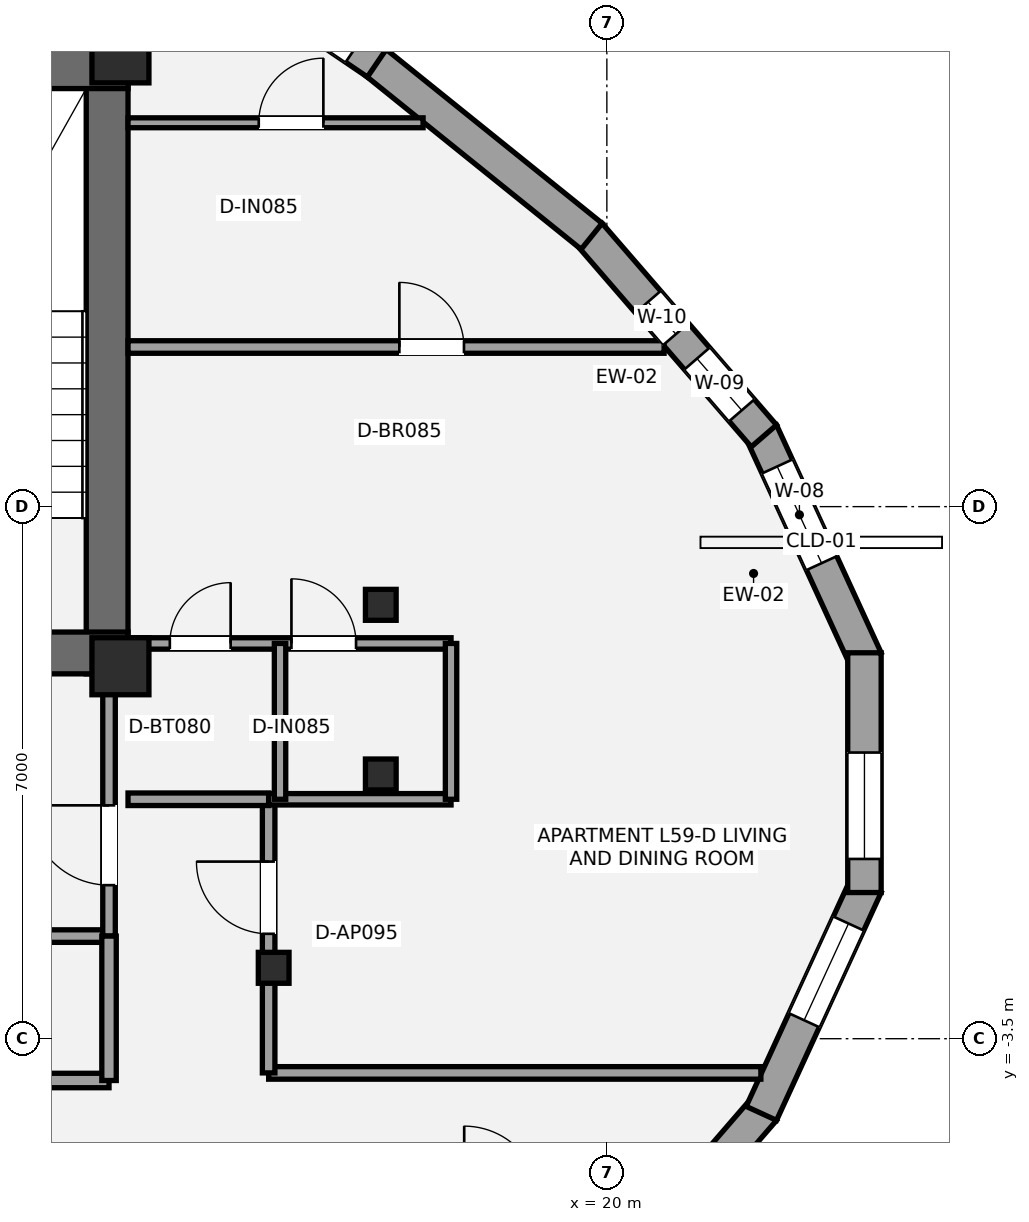
"""IFC4 building model, lengths in metres.
Left out: names, types, materials, properties, quantities, classifications, styles, units other than length and angle.
Written with IfcOpenShell. Run it as: python <this file> out.ifc"""

import sys

from ifc_helpers import new_model, si_unit, direction, frame, frame_2d, origin, origin_2d, place, context, subcontext, project, spatial, rectangle, i_section, extrude, element, fill, save


model = new_model("IFC4")
c1 = context("Model", 3, precision=1e-05, world=origin(), true_north=direction((0.0, 1.0)))
c2 = subcontext(c1, "Body", "Model", "MODEL_VIEW")
j1 = project(units=[si_unit("LENGTHUNIT", "METRE"), si_unit("PLANEANGLEUNIT", "RADIAN")], contexts=[c1])
p1 = place(None, origin())
s1 = spatial("IfcSite", under=j1, at=p1, CompositionType="ELEMENT")
p2 = place(p1, origin())
s2 = spatial("IfcBuilding", under=s1, at=p2, CompositionType="ELEMENT")
p3 = place(p2, frame((0.0, 0.0, 213.15)))
s3 = spatial("IfcBuildingStorey", under=s2, at=p3, CompositionType="ELEMENT", Elevation=213.15)
p4 = place(p3, frame((13.425, 1.3, 0.0), z_axis=(0.0, 0.0, 1.0), x_axis=(0.0, 1.0, 0.0)))
e1 = element("IfcWall", 1, at=p4, inside=s3, PredefinedType="SHEAR", context=c2, shape_type="SweptSolid", body=[
    extrude(rectangle(XDim=8.25, YDim=0.55, at=frame_2d((4.125, 0.0))), origin(), (0.0, 0.0, 1.0), 3.15),
])
p5 = place(p3, frame((4.525, 9.275, 0.0), z_axis=(0.0, 0.0, 1.0), x_axis=(1.0, 0.0, 0.0)))
e2 = element("IfcWall", 2, at=p5, inside=s3, PredefinedType="SHEAR", context=c2, shape_type="SweptSolid", body=[
    extrude(rectangle(XDim=9.175, YDim=0.55, at=frame_2d((4.587, 0.0))), origin(), (0.0, 0.0, 1.0), 3.15),
])
p6 = place(p3, frame((13.7, 1.575, 0.0), z_axis=(0.0, 0.0, 1.0), x_axis=(-1.0, 0.0, 0.0)))
e3 = element("IfcWall", 3, at=p6, inside=s3, PredefinedType="SHEAR", context=c2, shape_type="SweptSolid", body=[
    extrude(rectangle(XDim=8.775, YDim=0.55, at=frame_2d((4.387, 0.0))), origin(), (0.0, 0.0, 1.0), 3.15),
])
p7 = place(p6, frame((2.35, 0.0, 0.0)))
e4 = element("IfcOpeningElement", 4, at=p7, cuts=e3, PredefinedType="OPENING", context=c2, shape_type="SweptSolid", body=[
    extrude(rectangle(XDim=1.05, YDim=2.15, at=frame_2d((0.525, 1.075))), frame((0.0, 0.285, 0.0), z_axis=(0.0, -1.0, 0.0), x_axis=(1.0, 0.0, 0.0)), (0.0, 0.0, 1.0), 0.57),
])
p8 = place(p6, frame((4.35, 0.0, 0.0)))
e5 = element("IfcOpeningElement", 5, at=p8, cuts=e3, PredefinedType="OPENING", context=c2, shape_type="SweptSolid", body=[
    extrude(rectangle(XDim=1.1, YDim=2.2, at=frame_2d((0.55, 1.1))), frame((0.0, 0.285, 0.0), z_axis=(0.0, -1.0, 0.0), x_axis=(1.0, 0.0, 0.0)), (0.0, 0.0, 1.0), 0.57),
])
for number, where, z_axis, x_axis in (
    (6, (13.6, 1.4, 0.0), (0.0, 0.0, 1.0), (1.0, 0.0, 0.0)),
    (7, (13.6, 9.45, 0.0), (0.0, 0.0, 1.0), (1.0, 0.0, 0.0)),
):
    element("IfcColumn", number, at=place(p3, frame(where, z_axis=z_axis, x_axis=x_axis)), inside=s3, PredefinedType="PILASTER", context=c2, shape_type="SweptSolid", body=[
        extrude(rectangle(XDim=0.75, YDim=0.75, at=origin_2d()), origin(), (0.0, 0.0, 1.0), 3.15),
    ])
for number, where, z_axis, x_axis in (
    (8, (17.026, 2.208, 0.0), (0.0, 0.0, 1.0), (1.0, 0.0, 0.0)),
    (9, (15.616, -2.567, 0.0), (0.0, 0.0, 1.0), (1.0, 0.0, 0.0)),
    (10, (17.026, -0.024, 0.0), (0.0, 0.0, 1.0), (1.0, 0.0, 0.0)),
):
    element("IfcColumn", number, at=place(p3, frame(where, z_axis=z_axis, x_axis=x_axis)), inside=s3, PredefinedType="COLUMN", context=c2, shape_type="SweptSolid", body=[
        extrude(i_section(OverallWidth=0.404, OverallDepth=0.407, WebThickness=0.027, FlangeThickness=0.044, at=origin_2d()), origin(), (0.0, 0.0, 1.0), 3.15),
    ])
p9 = place(p3, frame((22.033, 4.482, 0.0), z_axis=(0.0, 0.0, 1.0), x_axis=(0.417358097416, -0.908742107818, 0.0)))
e11 = element("IfcWall", 11, at=p9, inside=s3, PredefinedType="STANDARD", context=c2, shape_type="SweptSolid", body=[
    extrude(rectangle(XDim=3.298, YDim=0.44, at=frame_2d((1.649, 0.0))), origin(), (0.0, 0.0, 1.0), 2.336),
])
p10 = place(p9, frame((0.5, 0.0, 0.55)))
e12 = element("IfcOpeningElement", 12, at=p10, cuts=e11, PredefinedType="OPENING", context=c2, shape_type="SweptSolid", body=[
    extrude(rectangle(XDim=1.4, YDim=1.55, at=frame_2d((0.7, 0.775))), frame((0.0, 0.23, 0.0), z_axis=(0.0, -1.0, 0.0), x_axis=(1.0, 0.0, 0.0)), (0.0, 0.0, 1.0), 0.46),
])
p11 = place(p3, frame((19.771, 7.084, 0.0), z_axis=(0.0, 0.0, 1.0), x_axis=(0.654143325051, -0.75637061702, 0.0)))
e13 = element("IfcWall", 13, at=p11, inside=s3, PredefinedType="STANDARD", context=c2, shape_type="SweptSolid", body=[
    extrude(rectangle(XDim=3.508, YDim=0.44, at=frame_2d((1.754, 0.0))), origin(), (0.0, 0.0, 1.0), 2.336),
])
p12 = place(p11, frame((2.163, 0.0, 0.58)))
e14 = element("IfcOpeningElement", 14, at=p12, cuts=e13, PredefinedType="OPENING", context=c2, shape_type="SweptSolid", body=[
    extrude(rectangle(XDim=0.9, YDim=1.35, at=frame_2d((0.45, 0.675))), frame((0.0, 0.23, 0.0), z_axis=(0.0, -1.0, 0.0), x_axis=(1.0, 0.0, 0.0)), (0.0, 0.0, 1.0), 0.46),
])
p13 = place(p11, frame((1.178, 0.0, 1.05)))
e15 = element("IfcOpeningElement", 15, at=p13, cuts=e13, PredefinedType="OPENING", context=c2, shape_type="SweptSolid", body=[
    extrude(rectangle(XDim=0.56, YDim=1.15, at=frame_2d((0.28, 0.575))), frame((0.0, 0.23, 0.0), z_axis=(0.0, -1.0, 0.0), x_axis=(1.0, 0.0, 0.0)), (0.0, 0.0, 1.0), 0.46),
])
p14 = place(p3, frame((16.958, 9.345, 0.0), z_axis=(0.0, 0.0, 1.0), x_axis=(0.778794775864, -0.627278803314, 0.0)))
e16 = element("IfcWall", 16, at=p14, inside=s3, PredefinedType="STANDARD", context=c2, shape_type="SweptSolid", body=[
    extrude(rectangle(XDim=3.648, YDim=0.44, at=frame_2d((1.824, 0.0))), origin(), (0.0, 0.0, 1.0), 2.336),
])
p15 = place(p3, frame((13.907, 11.413, 0.0), z_axis=(0.0, 0.0, 1.0), x_axis=(0.827592777121, -0.561328954586, 0.0)))
e17 = element("IfcWall", 17, at=p15, inside=s3, PredefinedType="STANDARD", context=c2, shape_type="SweptSolid", body=[
    extrude(rectangle(XDim=3.704, YDim=0.44, at=frame_2d((1.852, 0.0))), origin(), (0.0, 0.0, 1.0), 2.336),
])
p16 = place(p15, frame((1.958, 0.0, 0.58)))
e18 = element("IfcOpeningElement", 18, at=p16, cuts=e17, PredefinedType="OPENING", context=c2, shape_type="SweptSolid", body=[
    extrude(rectangle(XDim=1.4, YDim=1.55, at=frame_2d((0.7, 0.775))), frame((0.0, 0.23, 0.0), z_axis=(0.0, -1.0, 0.0), x_axis=(1.0, 0.0, 0.0)), (0.0, 0.0, 1.0), 0.46),
])
p17 = place(p3, frame((22.066, -4.43, 0.0), z_axis=(0.0, 0.0, 1.0), x_axis=(-0.654143325051, -0.75637061702, 0.0)))
e19 = element("IfcWall", 19, at=p17, inside=s3, PredefinedType="STANDARD", context=c2, shape_type="SweptSolid", body=[
    extrude(rectangle(XDim=3.508, YDim=0.44, at=frame_2d((1.754, 0.0))), origin(), (0.0, 0.0, 1.0), 2.336),
])
p18 = place(p17, frame((1.86, 0.0, 0.58)))
e20 = element("IfcOpeningElement", 20, at=p18, cuts=e19, PredefinedType="OPENING", context=c2, shape_type="SweptSolid", body=[
    extrude(rectangle(XDim=1.4, YDim=1.55, at=frame_2d((0.7, 0.775))), frame((0.0, 0.23, 0.0), z_axis=(0.0, -1.0, 0.0), x_axis=(1.0, 0.0, 0.0)), (0.0, 0.0, 1.0), 0.46),
])
p19 = place(p3, frame((23.409, -1.485, 0.0), z_axis=(0.0, 0.0, 1.0), x_axis=(-0.417358097416, -0.908742107818, 0.0)))
e21 = element("IfcWall", 21, at=p19, inside=s3, PredefinedType="STANDARD", context=c2, shape_type="SweptSolid", body=[
    extrude(rectangle(XDim=3.298, YDim=0.44, at=frame_2d((1.649, 0.0))), origin(), (0.0, 0.0, 1.0), 2.336),
])
p20 = place(p19, frame((0.55, 0.0, 0.55)))
e22 = element("IfcOpeningElement", 22, at=p20, cuts=e21, PredefinedType="OPENING", context=c2, shape_type="SweptSolid", body=[
    extrude(rectangle(XDim=1.4, YDim=1.55, at=frame_2d((0.7, 0.775))), frame((0.0, 0.23, 0.0), z_axis=(0.0, -1.0, 0.0), x_axis=(1.0, 0.0, 0.0)), (0.0, 0.0, 1.0), 0.46),
])
p21 = place(p3, frame((23.389, 1.577, 0.0), z_axis=(0.0, 0.0, 1.0), x_axis=(0.0, -1.0, 0.0)))
e23 = element("IfcWall", 23, at=p21, inside=s3, PredefinedType="STANDARD", context=c2, shape_type="SweptSolid", body=[
    extrude(rectangle(XDim=3.154, YDim=0.44, at=frame_2d((1.577, 0.0))), origin(), (0.0, 0.0, 1.0), 2.336),
])
p22 = place(p21, frame((1.312, 0.0, 0.58)))
e24 = element("IfcOpeningElement", 24, at=p22, cuts=e23, PredefinedType="OPENING", context=c2, shape_type="SweptSolid", body=[
    extrude(rectangle(XDim=1.4, YDim=1.55, at=frame_2d((0.7, 0.775))), frame((0.0, 0.23, 0.0), z_axis=(0.0, -1.0, 0.0), x_axis=(1.0, 0.0, 0.0)), (0.0, 0.0, 1.0), 0.46),
])
p23 = place(p3, frame((7.2, -2.15, 0.0), z_axis=(0.0, 0.0, 1.0), x_axis=(1.0, 0.0, 0.0)))
e25 = element("IfcWall", 25, at=p23, inside=s3, PredefinedType="PARTITIONING", context=c2, shape_type="SweptSolid", body=[
    extrude(rectangle(XDim=6.25, YDim=0.165, at=frame_2d((3.125, 0.0))), origin(), (0.0, 0.0, 1.0), 2.423),
])
p24 = place(p3, frame((13.45, -2.15, 0.0), z_axis=(0.0, 0.0, 1.0), x_axis=(0.0, 1.0, 0.0)))
e26 = element("IfcWall", 26, at=p24, inside=s3, PredefinedType="PARTITIONING", context=c2, shape_type="SweptSolid", body=[
    extrude(rectangle(XDim=3.5, YDim=0.165, at=frame_2d((1.75, 0.0))), origin(), (0.0, 0.0, 1.0), 2.423),
])
p25 = place(p24, frame((0.67, 0.0, 0.0)))
e27 = element("IfcOpeningElement", 27, at=p25, cuts=e26, PredefinedType="OPENING", context=c2, shape_type="SweptSolid", body=[
    extrude(rectangle(XDim=1.05, YDim=2.15, at=frame_2d((0.525, 1.075))), frame((0.0, 0.093, 0.0), z_axis=(0.0, -1.0, 0.0), x_axis=(1.0, 0.0, 0.0)), (0.0, 0.0, 1.0), 0.185),
])
p26 = place(p3, frame((2.1, -4.05, 0.0), z_axis=(0.0, 0.0, 1.0), x_axis=(1.0, 0.0, 0.0)))
e28 = element("IfcWall", 28, at=p26, inside=s3, PredefinedType="PLUMBINGWALL", context=c2, shape_type="SweptSolid", body=[
    extrude(rectangle(XDim=11.35, YDim=0.19, at=frame_2d((5.675, 0.0))), origin(), (0.0, 0.0, 1.0), 2.357),
])
p27 = place(p26, frame((1.4, 0.0, 0.0)))
e29 = element("IfcOpeningElement", 29, at=p27, cuts=e28, PredefinedType="OPENING", context=c2, shape_type="SweptSolid", body=[
    extrude(rectangle(XDim=0.9, YDim=2.1, at=frame_2d((0.45, 1.05))), frame((0.0, 0.105, 0.0), z_axis=(0.0, -1.0, 0.0), x_axis=(1.0, 0.0, 0.0)), (0.0, 0.0, 1.0), 0.21),
])
p28 = place(p26, frame((5.3, 0.0, 0.0)))
e30 = element("IfcOpeningElement", 30, at=p28, cuts=e28, PredefinedType="OPENING", context=c2, shape_type="SweptSolid", body=[
    extrude(rectangle(XDim=0.9, YDim=2.1, at=frame_2d((0.45, 1.05))), frame((0.0, 0.105, 0.0), z_axis=(0.0, -1.0, 0.0), x_axis=(1.0, 0.0, 0.0)), (0.0, 0.0, 1.0), 0.21),
])
p29 = place(p26, frame((9.1, 0.0, 0.0)))
e31 = element("IfcOpeningElement", 31, at=p29, cuts=e28, PredefinedType="OPENING", context=c2, shape_type="SweptSolid", body=[
    extrude(rectangle(XDim=0.9, YDim=2.1, at=frame_2d((0.45, 1.05))), frame((0.0, 0.105, 0.0), z_axis=(0.0, -1.0, 0.0), x_axis=(1.0, 0.0, 0.0)), (0.0, 0.0, 1.0), 0.21),
])
p30 = place(p3, frame((13.45, -4.05, 0.0), z_axis=(0.0, 0.0, 1.0), x_axis=(0.0, 1.0, 0.0)))
e32 = element("IfcWall", 32, at=p30, inside=s3, PredefinedType="PLUMBINGWALL", context=c2, shape_type="SweptSolid", body=[
    extrude(rectangle(XDim=1.9, YDim=0.19, at=frame_2d((0.95, 0.0))), origin(), (0.0, 0.0, 1.0), 2.423),
])
p31 = place(p3, frame((15.55, -3.95, 0.0), z_axis=(0.0, 0.0, 1.0), x_axis=(1.0, 0.0, 0.0)))
e33 = element("IfcWall", 33, at=p31, inside=s3, PredefinedType="PARTITIONING", context=c2, shape_type="SweptSolid", body=[
    extrude(rectangle(XDim=6.476, YDim=0.165, at=frame_2d((3.238, 0.0))), origin(), (0.0, 0.0, 1.0), 2.423),
])
p32 = place(p3, frame((15.55, -3.95, 0.0), z_axis=(0.0, 0.0, 1.0), x_axis=(0.0, 1.0, 0.0)))
e34 = element("IfcWall", 34, at=p32, inside=s3, PredefinedType="PARTITIONING", context=c2, shape_type="SweptSolid", body=[
    extrude(rectangle(XDim=3.6, YDim=0.165, at=frame_2d((1.8, 0.0))), origin(), (0.0, 0.0, 1.0), 2.357),
])
p33 = place(p32, frame((1.83, 0.0, 0.0)))
e35 = element("IfcOpeningElement", 35, at=p33, cuts=e34, PredefinedType="OPENING", context=c2, shape_type="SweptSolid", body=[
    extrude(rectangle(XDim=0.95, YDim=2.15, at=frame_2d((0.475, 1.075))), frame((0.0, 0.093, 0.0), z_axis=(0.0, -1.0, 0.0), x_axis=(1.0, 0.0, 0.0)), (0.0, 0.0, 1.0), 0.185),
])
p34 = place(p3, frame((13.7, -0.35, 0.0), z_axis=(0.0, 0.0, 1.0), x_axis=(1.0, 0.0, 0.0)))
e36 = element("IfcWall", 36, at=p34, inside=s3, PredefinedType="PARTITIONING", context=c2, shape_type="SweptSolid", body=[
    extrude(rectangle(XDim=1.85, YDim=0.165, at=frame_2d((0.925, 0.0))), origin(), (0.0, 0.0, 1.0), 2.423),
])
p35 = place(p3, frame((13.7, 5.6, 0.0), z_axis=(0.0, 0.0, 1.0), x_axis=(1.0, 0.0, 0.0)))
e37 = element("IfcWall", 37, at=p35, inside=s3, PredefinedType="PARTITIONING", context=c2, shape_type="SweptSolid", body=[
    extrude(rectangle(XDim=7.053, YDim=0.165, at=frame_2d((3.527, 0.0))), origin(), (0.0, 0.0, 1.0), 2.423),
])
p36 = place(p35, frame((3.57, 0.0, 0.0)))
e38 = element("IfcOpeningElement", 38, at=p36, cuts=e37, PredefinedType="OPENING", context=c2, shape_type="SweptSolid", body=[
    extrude(rectangle(XDim=0.85, YDim=2.1, at=frame_2d((0.425, 1.05))), frame((0.0, 0.093, 0.0), z_axis=(0.0, -1.0, 0.0), x_axis=(1.0, 0.0, 0.0)), (0.0, 0.0, 1.0), 0.185),
])
p37 = place(p3, frame((13.7, 1.7, 0.0), z_axis=(0.0, 0.0, 1.0), x_axis=(1.0, 0.0, 0.0)))
e39 = element("IfcWall", 39, at=p37, inside=s3, PredefinedType="PLUMBINGWALL", context=c2, shape_type="SweptSolid", body=[
    extrude(rectangle(XDim=4.25, YDim=0.15, at=frame_2d((2.125, 0.0))), origin(), (0.0, 0.0, 1.0), 2.423),
])
p38 = place(p37, frame((0.55, 0.0, 0.0)))
e40 = element("IfcOpeningElement", 40, at=p38, cuts=e39, PredefinedType="OPENING", context=c2, shape_type="SweptSolid", body=[
    extrude(rectangle(XDim=0.8, YDim=2.1, at=frame_2d((0.4, 1.05))), frame((0.0, 0.085, 0.0), z_axis=(0.0, -1.0, 0.0), x_axis=(1.0, 0.0, 0.0)), (0.0, 0.0, 1.0), 0.17),
])
p39 = place(p37, frame((2.15, 0.0, 0.0)))
e41 = element("IfcOpeningElement", 41, at=p39, cuts=e39, PredefinedType="OPENING", context=c2, shape_type="SweptSolid", body=[
    extrude(rectangle(XDim=0.85, YDim=2.1, at=frame_2d((0.425, 1.05))), frame((0.0, 0.085, 0.0), z_axis=(0.0, -1.0, 0.0), x_axis=(1.0, 0.0, 0.0)), (0.0, 0.0, 1.0), 0.17),
])
p40 = place(p3, frame((15.55, -0.35, 0.0), z_axis=(0.0, 0.0, 1.0), x_axis=(1.0, 0.0, 0.0)))
e42 = element("IfcWall", 42, at=p40, inside=s3, PredefinedType="PLUMBINGWALL", context=c2, shape_type="SweptSolid", body=[
    extrude(rectangle(XDim=2.4, YDim=0.15, at=frame_2d((1.2, 0.0))), origin(), (0.0, 0.0, 1.0), 2.423),
])
for number, where, z_axis, x_axis in (
    (43, (15.7, -0.35, 0.0), (0.0, 0.0, 1.0), (0.0, 1.0, 0.0)),
    (44, (17.95, -0.35, 0.0), (0.0, 0.0, 1.0), (0.0, 1.0, 0.0)),
):
    element("IfcWall", number, at=place(p3, frame(where, z_axis=z_axis, x_axis=x_axis)), inside=s3, PredefinedType="PLUMBINGWALL", context=c2, shape_type="SweptSolid", body=[
        extrude(rectangle(XDim=2.05, YDim=0.15, at=frame_2d((1.025, 0.0))), origin(), (0.0, 0.0, 1.0), 2.97),
    ])
p41 = place(p3, frame((13.7, 8.55, 0.0), z_axis=(0.0, 0.0, 1.0), x_axis=(1.0, 0.0, 0.0)))
e45 = element("IfcWall", 45, at=p41, inside=s3, PredefinedType="PARTITIONING", context=c2, shape_type="SweptSolid", body=[
    extrude(rectangle(XDim=3.882, YDim=0.13, at=frame_2d((1.941, 0.0))), origin(), (0.0, 0.0, 1.0), 2.423),
])
p42 = place(p41, frame((1.72, 0.0, 0.0)))
e46 = element("IfcOpeningElement", 46, at=p42, cuts=e45, PredefinedType="OPENING", context=c2, shape_type="SweptSolid", body=[
    extrude(rectangle(XDim=0.85, YDim=2.1, at=frame_2d((0.425, 1.05))), frame((0.0, 0.075, 0.0), z_axis=(0.0, -1.0, 0.0), x_axis=(1.0, 0.0, 0.0)), (0.0, 0.0, 1.0), 0.15),
])
p43 = place(p10, origin())
e47 = element("IfcWindow", 47, at=p43, inside=s3, PartitioningType="SINGLE_PANEL", PredefinedType="WINDOW", context=c2, shape_type="SweptSolid", body=[
    extrude(rectangle(XDim=1.4, YDim=1.55, at=frame_2d((0.7, 0.775))), frame((0.0, -0.01, 0.0), z_axis=(0.0, -1.0, 0.0), x_axis=(1.0, 0.0, 0.0)), (0.0, 0.0, 1.0), 0.06),
])
fill(e12, e47)
p44 = place(p12, origin())
e48 = element("IfcWindow", 48, at=p44, inside=s3, PartitioningType="SINGLE_PANEL", PredefinedType="WINDOW", context=c2, shape_type="SweptSolid", body=[
    extrude(rectangle(XDim=0.9, YDim=1.35, at=frame_2d((0.45, 0.675))), frame((0.0, -0.01, 0.0), z_axis=(0.0, -1.0, 0.0), x_axis=(1.0, 0.0, 0.0)), (0.0, 0.0, 1.0), 0.06),
])
fill(e14, e48)
p45 = place(p16, origin())
e49 = element("IfcWindow", 49, at=p45, inside=s3, PartitioningType="SINGLE_PANEL", PredefinedType="WINDOW", context=c2, shape_type="SweptSolid", body=[
    extrude(rectangle(XDim=1.4, YDim=1.55, at=frame_2d((0.7, 0.775))), frame((0.0, -0.01, 0.0), z_axis=(0.0, -1.0, 0.0), x_axis=(1.0, 0.0, 0.0)), (0.0, 0.0, 1.0), 0.06),
])
fill(e18, e49)
p46 = place(p20, origin())
e50 = element("IfcWindow", 50, at=p46, inside=s3, PartitioningType="SINGLE_PANEL", PredefinedType="WINDOW", context=c2, shape_type="SweptSolid", body=[
    extrude(rectangle(XDim=1.4, YDim=1.55, at=frame_2d((0.7, 0.775))), frame((0.0, -0.01, 0.0), z_axis=(0.0, -1.0, 0.0), x_axis=(1.0, 0.0, 0.0)), (0.0, 0.0, 1.0), 0.06),
])
fill(e22, e50)
p47 = place(p22, origin())
e51 = element("IfcWindow", 51, at=p47, inside=s3, PartitioningType="SINGLE_PANEL", PredefinedType="WINDOW", context=c2, shape_type="SweptSolid", body=[
    extrude(rectangle(XDim=1.4, YDim=1.55, at=frame_2d((0.7, 0.775))), frame((0.0, -0.01, 0.0), z_axis=(0.0, -1.0, 0.0), x_axis=(1.0, 0.0, 0.0)), (0.0, 0.0, 1.0), 0.06),
])
fill(e24, e51)
p48 = place(p13, origin())
e52 = element("IfcWindow", 52, at=p48, inside=s3, PartitioningType="SINGLE_PANEL", PredefinedType="WINDOW", context=c2, shape_type="SweptSolid", body=[
    extrude(rectangle(XDim=0.56, YDim=1.15, at=frame_2d((0.28, 0.575))), frame((0.0, -0.01, 0.0), z_axis=(0.0, -1.0, 0.0), x_axis=(1.0, 0.0, 0.0)), (0.0, 0.0, 1.0), 0.06),
])
fill(e15, e52)
p49 = place(p25, origin())
e53 = element("IfcDoor", 53, at=p49, inside=s3, OperationType="SINGLE_SWING_RIGHT", PredefinedType="DOOR", context=c2, shape_type="SweptSolid", body=[
    extrude(rectangle(XDim=1.05, YDim=2.15, at=frame_2d((0.525, 1.075))), frame((0.0, 0.025, 0.0), z_axis=(0.0, -1.0, 0.0), x_axis=(1.0, 0.0, 0.0)), (0.0, 0.0, 1.0), 0.05),
])
fill(e27, e53)
p50 = place(p33, origin())
e54 = element("IfcDoor", 54, at=p50, inside=s3, OperationType="SINGLE_SWING_RIGHT", PredefinedType="DOOR", context=c2, shape_type="SweptSolid", body=[
    extrude(rectangle(XDim=0.95, YDim=2.15, at=frame_2d((0.475, 1.075))), frame((0.0, 0.025, 0.0), z_axis=(0.0, -1.0, 0.0), x_axis=(1.0, 0.0, 0.0)), (0.0, 0.0, 1.0), 0.05),
])
fill(e35, e54)
p51 = place(p38, origin())
e55 = element("IfcDoor", 55, at=p51, inside=s3, OperationType="SINGLE_SWING_RIGHT", PredefinedType="DOOR", context=c2, shape_type="SweptSolid", body=[
    extrude(rectangle(XDim=0.8, YDim=2.1, at=frame_2d((0.4, 1.05))), frame((0.0, 0.025, 0.0), z_axis=(0.0, -1.0, 0.0), x_axis=(1.0, 0.0, 0.0)), (0.0, 0.0, 1.0), 0.05),
])
fill(e40, e55)
p52 = place(p39, origin())
e56 = element("IfcDoor", 56, at=p52, inside=s3, OperationType="SINGLE_SWING_LEFT", PredefinedType="DOOR", context=c2, shape_type="SweptSolid", body=[
    extrude(rectangle(XDim=0.85, YDim=2.1, at=frame_2d((0.425, 1.05))), frame((0.0, 0.025, 0.0), z_axis=(0.0, -1.0, 0.0), x_axis=(1.0, 0.0, 0.0)), (0.0, 0.0, 1.0), 0.05),
])
fill(e41, e56)
p53 = place(p36, origin())
e57 = element("IfcDoor", 57, at=p53, inside=s3, OperationType="SINGLE_SWING_LEFT", PredefinedType="DOOR", context=c2, shape_type="SweptSolid", body=[
    extrude(rectangle(XDim=0.85, YDim=2.1, at=frame_2d((0.425, 1.05))), frame((0.0, 0.025, 0.0), z_axis=(0.0, -1.0, 0.0), x_axis=(1.0, 0.0, 0.0)), (0.0, 0.0, 1.0), 0.05),
])
fill(e38, e57)
p54 = place(p42, origin())
e58 = element("IfcDoor", 58, at=p54, inside=s3, OperationType="SINGLE_SWING_RIGHT", PredefinedType="DOOR", context=c2, shape_type="SweptSolid", body=[
    extrude(rectangle(XDim=0.85, YDim=2.1, at=frame_2d((0.425, 1.05))), frame((0.0, 0.025, 0.0), z_axis=(0.0, -1.0, 0.0), x_axis=(1.0, 0.0, 0.0)), (0.0, 0.0, 1.0), 0.05),
])
fill(e46, e58)
save(model, sys.argv[1])
